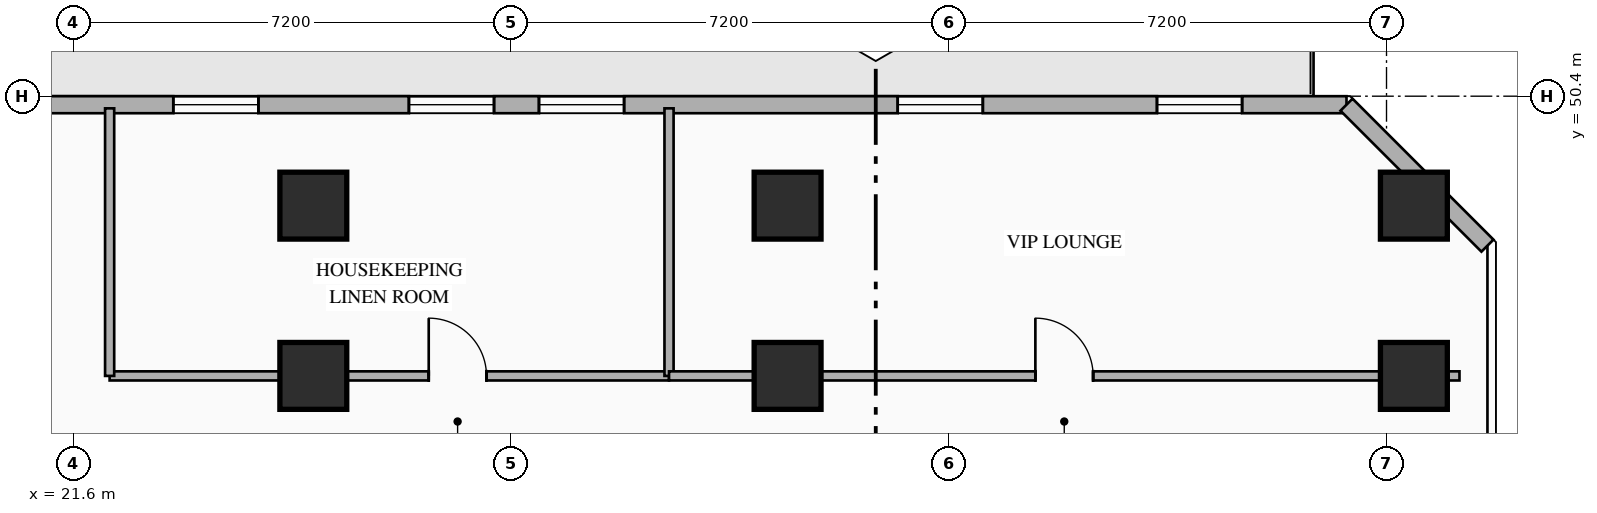
"""IFC4 building model, lengths in metres.
Left out: names, types, materials, properties, quantities, classifications, styles, units other than length and angle.
Written with IfcOpenShell. Run it as: python <this file> out.ifc"""

import sys

from ifc_helpers import new_model, si_unit, direction, frame, frame_2d, origin, origin_2d, place, context, subcontext, project, spatial, rectangle, hollow_rectangle, extrude, element, fill, save


model = new_model("IFC4")
c1 = context("Model", 3, precision=1e-05, world=origin(), true_north=direction((0.0, 1.0)))
c2 = subcontext(c1, "Body", "Model", "MODEL_VIEW")
j1 = project(units=[si_unit("LENGTHUNIT", "METRE"), si_unit("PLANEANGLEUNIT", "RADIAN")], contexts=[c1])
p1 = place(None, origin())
s1 = spatial("IfcSite", under=j1, at=p1, CompositionType="ELEMENT")
p2 = place(p1, origin())
s2 = spatial("IfcBuilding", under=s1, at=p2, CompositionType="ELEMENT")
p3 = place(p2, frame((0.0, 0.0, 53.35)))
s3 = spatial("IfcBuildingStorey", under=s2, at=p3, CompositionType="ELEMENT", Elevation=53.35)
for number, where, z_axis, x_axis in (
    (1, (25.55, 45.8, 0.0), (0.0, 0.0, 1.0), (1.0, 0.0, 0.0)),
    (2, (33.35, 45.8, 0.0), (0.0, 0.0, 1.0), (1.0, 0.0, 0.0)),
    (3, (43.65, 45.8, 0.0), (0.0, 0.0, 1.0), (1.0, 0.0, 0.0)),
    (4, (25.55, 48.6, 0.0), (0.0, 0.0, 1.0), (1.0, 0.0, 0.0)),
    (5, (33.35, 48.6, 0.0), (0.0, 0.0, 1.0), (1.0, 0.0, 0.0)),
    (6, (43.65, 48.6, 0.0), (0.0, 0.0, 1.0), (1.0, 0.0, 0.0)),
):
    element("IfcColumn", number, at=place(p3, frame(where, z_axis=z_axis, x_axis=x_axis)), inside=s3, PredefinedType="COLUMN", context=c2, shape_type="SweptSolid", body=[
        extrude(hollow_rectangle(XDim=1.1, YDim=1.1, WallThickness=0.04, at=origin_2d()), origin(), (0.0, 0.0, 1.0), 3.35),
    ])
p4 = place(p3, frame((2.458, 50.26, 0.0), z_axis=(0.0, 0.0, 1.0), x_axis=(1.0, 0.0, 0.0)))
e7 = element("IfcWall", 7, at=p4, inside=s3, PredefinedType="STANDARD", context=c2, shape_type="SweptSolid", body=[
    extrude(rectangle(XDim=40.084, YDim=0.28, at=frame_2d((20.042, 0.0))), origin(), (0.0, 0.0, 1.0), 3.13),
])
p5 = place(p4, frame((4.26, 0.0, 0.0)))
e8 = element("IfcOpeningElement", 8, at=p5, cuts=e7, PredefinedType="OPENING", context=c2, shape_type="SweptSolid", body=[
    extrude(rectangle(XDim=1.1, YDim=2.2, at=frame_2d((0.55, 1.1))), frame((0.0, 0.15, 0.0), z_axis=(0.0, -1.0, 0.0), x_axis=(1.0, 0.0, 0.0)), (0.0, 0.0, 1.0), 0.3),
])
p6 = place(p4, frame((1.717, 0.0, 0.85)))
e9 = element("IfcOpeningElement", 9, at=p6, cuts=e7, PredefinedType="OPENING", context=c2, shape_type="SweptSolid", body=[
    extrude(rectangle(XDim=1.4, YDim=1.8, at=frame_2d((0.7, 0.9))), frame((0.0, 0.15, 0.0), z_axis=(0.0, -1.0, 0.0), x_axis=(1.0, 0.0, 0.0)), (0.0, 0.0, 1.0), 0.3),
])
p7 = place(p4, frame((10.0, 0.0, 0.85)))
e10 = element("IfcOpeningElement", 10, at=p7, cuts=e7, PredefinedType="OPENING", context=c2, shape_type="SweptSolid", body=[
    extrude(rectangle(XDim=1.4, YDim=1.8, at=frame_2d((0.7, 0.9))), frame((0.0, 0.15, 0.0), z_axis=(0.0, -1.0, 0.0), x_axis=(1.0, 0.0, 0.0)), (0.0, 0.0, 1.0), 0.3),
])
p8 = place(p4, frame((14.02, 0.0, 0.85)))
e11 = element("IfcOpeningElement", 11, at=p8, cuts=e7, PredefinedType="OPENING", context=c2, shape_type="SweptSolid", body=[
    extrude(rectangle(XDim=1.4, YDim=1.8, at=frame_2d((0.7, 0.9))), frame((0.0, 0.15, 0.0), z_axis=(0.0, -1.0, 0.0), x_axis=(1.0, 0.0, 0.0)), (0.0, 0.0, 1.0), 0.3),
])
p9 = place(p4, frame((20.789, 0.0, 0.85)))
e12 = element("IfcOpeningElement", 12, at=p9, cuts=e7, PredefinedType="OPENING", context=c2, shape_type="SweptSolid", body=[
    extrude(rectangle(XDim=1.4, YDim=1.8, at=frame_2d((0.7, 0.9))), frame((0.0, 0.15, 0.0), z_axis=(0.0, -1.0, 0.0), x_axis=(1.0, 0.0, 0.0)), (0.0, 0.0, 1.0), 0.3),
])
p10 = place(p4, frame((24.664, 0.0, 0.85)))
e13 = element("IfcOpeningElement", 13, at=p10, cuts=e7, PredefinedType="OPENING", context=c2, shape_type="SweptSolid", body=[
    extrude(rectangle(XDim=1.4, YDim=1.8, at=frame_2d((0.7, 0.9))), frame((0.0, 0.15, 0.0), z_axis=(0.0, -1.0, 0.0), x_axis=(1.0, 0.0, 0.0)), (0.0, 0.0, 1.0), 0.3),
])
p11 = place(p4, frame((26.803, 0.0, 0.85)))
e14 = element("IfcOpeningElement", 14, at=p11, cuts=e7, PredefinedType="OPENING", context=c2, shape_type="SweptSolid", body=[
    extrude(rectangle(XDim=1.4, YDim=1.8, at=frame_2d((0.7, 0.9))), frame((0.0, 0.15, 0.0), z_axis=(0.0, -1.0, 0.0), x_axis=(1.0, 0.0, 0.0)), (0.0, 0.0, 1.0), 0.3),
])
p12 = place(p4, frame((32.703, 0.0, 0.85)))
e15 = element("IfcOpeningElement", 15, at=p12, cuts=e7, PredefinedType="OPENING", context=c2, shape_type="SweptSolid", body=[
    extrude(rectangle(XDim=1.4, YDim=1.8, at=frame_2d((0.7, 0.9))), frame((0.0, 0.15, 0.0), z_axis=(0.0, -1.0, 0.0), x_axis=(1.0, 0.0, 0.0)), (0.0, 0.0, 1.0), 0.3),
])
p13 = place(p4, frame((36.967, 0.0, 0.85)))
e16 = element("IfcOpeningElement", 16, at=p13, cuts=e7, PredefinedType="OPENING", context=c2, shape_type="SweptSolid", body=[
    extrude(rectangle(XDim=1.4, YDim=1.8, at=frame_2d((0.7, 0.9))), frame((0.0, 0.15, 0.0), z_axis=(0.0, -1.0, 0.0), x_axis=(1.0, 0.0, 0.0)), (0.0, 0.0, 1.0), 0.3),
])
p14 = place(p3, frame((42.542, 50.26, 0.0), z_axis=(0.0, 0.0, 1.0), x_axis=(0.707106781187, -0.707106781187, 0.0)))
e17 = element("IfcWall", 17, at=p14, inside=s3, PredefinedType="STANDARD", context=c2, shape_type="SweptSolid", body=[
    extrude(rectangle(XDim=3.278, YDim=0.28, at=frame_2d((1.639, 0.0))), origin(), (0.0, 0.0, 1.0), 3.13),
])
p15 = place(p3, frame((22.2, 45.8, 0.0), z_axis=(0.0, 0.0, 1.0), x_axis=(1.0, 0.0, 0.0)))
e18 = element("IfcWall", 18, at=p15, inside=s3, PredefinedType="PARTITIONING", context=c2, shape_type="SweptSolid", body=[
    extrude(rectangle(XDim=9.2, YDim=0.15, at=frame_2d((4.6, 0.0))), origin(), (0.0, 0.0, 1.0), 2.425),
])
p16 = place(p15, frame((5.248, 0.0, 0.0)))
e19 = element("IfcOpeningElement", 19, at=p16, cuts=e18, PredefinedType="OPENING", context=c2, shape_type="SweptSolid", body=[
    extrude(rectangle(XDim=0.95, YDim=2.15, at=frame_2d((0.475, 1.075))), frame((0.0, 0.085, 0.0), z_axis=(0.0, -1.0, 0.0), x_axis=(1.0, 0.0, 0.0)), (0.0, 0.0, 1.0), 0.17),
])
for number, where, z_axis, x_axis in (
    (20, (22.2, 45.8, 0.0), (0.0, 0.0, 1.0), (0.0, 1.0, 0.0)),
    (21, (31.4, 45.8, 0.0), (0.0, 0.0, 1.0), (0.0, 1.0, 0.0)),
):
    element("IfcWall", number, at=place(p3, frame(where, z_axis=z_axis, x_axis=x_axis)), inside=s3, PredefinedType="PARTITIONING", context=c2, shape_type="SweptSolid", body=[
        extrude(rectangle(XDim=4.4, YDim=0.15, at=frame_2d((2.2, 0.0))), origin(), (0.0, 0.0, 1.0), 3.13),
    ])
p17 = place(p3, frame((31.4, 45.8, 0.0), z_axis=(0.0, 0.0, 1.0), x_axis=(1.0, 0.0, 0.0)))
e22 = element("IfcWall", 22, at=p17, inside=s3, PredefinedType="PARTITIONING", context=c2, shape_type="SweptSolid", body=[
    extrude(rectangle(XDim=13.0, YDim=0.15, at=frame_2d((6.5, 0.0))), origin(), (0.0, 0.0, 1.0), 2.425),
])
p18 = place(p17, frame((6.025, 0.0, 0.0)))
e23 = element("IfcOpeningElement", 23, at=p18, cuts=e22, PredefinedType="OPENING", context=c2, shape_type="SweptSolid", body=[
    extrude(rectangle(XDim=0.95, YDim=2.15, at=frame_2d((0.475, 1.075))), frame((0.0, 0.085, 0.0), z_axis=(0.0, -1.0, 0.0), x_axis=(1.0, 0.0, 0.0)), (0.0, 0.0, 1.0), 0.17),
])
p19 = place(p9, origin())
e24 = element("IfcWindow", 24, at=p19, inside=s3, PartitioningType="SINGLE_PANEL", PredefinedType="WINDOW", context=c2, shape_type="SweptSolid", body=[
    extrude(rectangle(XDim=1.4, YDim=1.8, at=frame_2d((0.7, 0.9))), frame((0.0, 0.03, 0.0), z_axis=(0.0, -1.0, 0.0), x_axis=(1.0, 0.0, 0.0)), (0.0, 0.0, 1.0), 0.06),
])
fill(e12, e24)
p20 = place(p10, origin())
e25 = element("IfcWindow", 25, at=p20, inside=s3, PartitioningType="SINGLE_PANEL", PredefinedType="WINDOW", context=c2, shape_type="SweptSolid", body=[
    extrude(rectangle(XDim=1.4, YDim=1.8, at=frame_2d((0.7, 0.9))), frame((0.0, 0.03, 0.0), z_axis=(0.0, -1.0, 0.0), x_axis=(1.0, 0.0, 0.0)), (0.0, 0.0, 1.0), 0.06),
])
fill(e13, e25)
p21 = place(p11, origin())
e26 = element("IfcWindow", 26, at=p21, inside=s3, PartitioningType="SINGLE_PANEL", PredefinedType="WINDOW", context=c2, shape_type="SweptSolid", body=[
    extrude(rectangle(XDim=1.4, YDim=1.8, at=frame_2d((0.7, 0.9))), frame((0.0, 0.03, 0.0), z_axis=(0.0, -1.0, 0.0), x_axis=(1.0, 0.0, 0.0)), (0.0, 0.0, 1.0), 0.06),
])
fill(e14, e26)
p22 = place(p12, origin())
e27 = element("IfcWindow", 27, at=p22, inside=s3, PartitioningType="SINGLE_PANEL", PredefinedType="WINDOW", context=c2, shape_type="SweptSolid", body=[
    extrude(rectangle(XDim=1.4, YDim=1.8, at=frame_2d((0.7, 0.9))), frame((0.0, 0.03, 0.0), z_axis=(0.0, -1.0, 0.0), x_axis=(1.0, 0.0, 0.0)), (0.0, 0.0, 1.0), 0.06),
])
fill(e15, e27)
p23 = place(p13, origin())
e28 = element("IfcWindow", 28, at=p23, inside=s3, PartitioningType="SINGLE_PANEL", PredefinedType="WINDOW", context=c2, shape_type="SweptSolid", body=[
    extrude(rectangle(XDim=1.4, YDim=1.8, at=frame_2d((0.7, 0.9))), frame((0.0, 0.03, 0.0), z_axis=(0.0, -1.0, 0.0), x_axis=(1.0, 0.0, 0.0)), (0.0, 0.0, 1.0), 0.06),
])
fill(e16, e28)
p24 = place(p16, origin())
e29 = element("IfcDoor", 29, at=p24, inside=s3, OperationType="SINGLE_SWING_LEFT", PredefinedType="DOOR", context=c2, shape_type="SweptSolid", body=[
    extrude(rectangle(XDim=0.95, YDim=2.15, at=frame_2d((0.475, 1.075))), frame((0.0, 0.025, 0.0), z_axis=(0.0, -1.0, 0.0), x_axis=(1.0, 0.0, 0.0)), (0.0, 0.0, 1.0), 0.05),
])
fill(e19, e29)
p25 = place(p18, origin())
e30 = element("IfcDoor", 30, at=p25, inside=s3, OperationType="SINGLE_SWING_LEFT", PredefinedType="DOOR", context=c2, shape_type="SweptSolid", body=[
    extrude(rectangle(XDim=0.95, YDim=2.15, at=frame_2d((0.475, 1.075))), frame((0.0, 0.025, 0.0), z_axis=(0.0, -1.0, 0.0), x_axis=(1.0, 0.0, 0.0)), (0.0, 0.0, 1.0), 0.05),
])
fill(e23, e30)
save(model, sys.argv[1])
